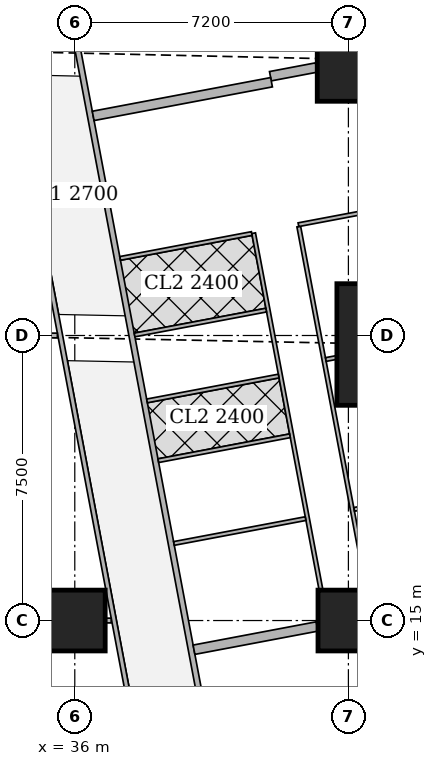
"""IFC4 building model, lengths in metres.
Left out: names, types, materials, properties, quantities, classifications, styles, units other than length and angle.
Written with IfcOpenShell. Run it as: python <this file> out.ifc"""

import sys

from ifc_helpers import new_model, si_unit, direction, frame, frame_2d, origin, origin_2d, place, context, subcontext, project, spatial, rectangle, extrude, element, fill, save


model = new_model("IFC4")
c1 = context("Model", 3, precision=1e-05, world=origin(), true_north=direction((0.0, 1.0)))
c2 = subcontext(c1, "Body", "Model", "MODEL_VIEW")
j1 = project(units=[si_unit("LENGTHUNIT", "METRE"), si_unit("PLANEANGLEUNIT", "RADIAN")], contexts=[c1])
p1 = place(None, origin())
s1 = spatial("IfcSite", under=j1, at=p1, CompositionType="ELEMENT")
p2 = place(p1, origin())
s2 = spatial("IfcBuilding", under=s1, at=p2, CompositionType="ELEMENT")
p3 = place(p2, frame((0.0, 0.0, 89.15)))
s3 = spatial("IfcBuildingStorey", under=s2, at=p3, CompositionType="ELEMENT", Elevation=89.15)
for number, where, z_axis, x_axis in (
    (1, (36.0, 15.0, 0.0), (0.0, 0.0, 1.0), (1.0, 0.0, 0.0)),
    (2, (43.2, 15.0, 0.0), (0.0, 0.0, 1.0), (1.0, 0.0, 0.0)),
):
    element("IfcColumn", number, at=place(p3, frame(where, z_axis=z_axis, x_axis=x_axis)), inside=s3, PredefinedType="COLUMN", context=c2, shape_type="SweptSolid", body=[
        extrude(rectangle(XDim=1.6, YDim=1.6, at=origin_2d()), origin(), (0.0, 0.0, 1.0), 3.75),
    ])
p4 = place(p3, frame((44.697, 22.263, 0.0), z_axis=(0.0, 0.0, 1.0), x_axis=(1.0, 0.0, 0.0)))
e3 = element("IfcColumn", 3, at=p4, inside=s3, PredefinedType="COLUMN", context=c2, shape_type="SweptSolid", body=[
    extrude(rectangle(XDim=3.6, YDim=3.2, at=origin_2d()), origin(), (0.0, 0.0, 1.0), 3.75),
])
p5 = place(p3, frame((43.48, 29.763, 0.0), z_axis=(0.0, 0.0, 1.0), x_axis=(1.0, 0.0, 0.0)))
e4 = element("IfcColumn", 4, at=p5, inside=s3, PredefinedType="COLUMN", context=c2, shape_type="SweptSolid", body=[
    extrude(rectangle(XDim=2.2, YDim=2.2, at=origin_2d()), origin(), (0.0, 0.0, 1.0), 3.75),
])
p6 = place(p3, frame((50.653, 2.703, 0.0), z_axis=(0.0, 0.0, 1.0), x_axis=(-0.185612026696, 0.982623109613, 0.0)))
e5 = element("IfcWall", 5, at=p6, inside=s3, PredefinedType="SOLIDWALL", context=c2, shape_type="SweptSolid", body=[
    extrude(rectangle(XDim=41.393, YDim=0.2, at=frame_2d((20.697, 0.0))), origin(), (0.0, 0.0, 1.0), 3.5),
])
p7 = place(p6, frame((1.633, 0.0, 0.9)))
e6 = element("IfcOpeningElement", 6, at=p7, cuts=e5, PredefinedType="OPENING", context=c2, shape_type="SweptSolid", body=[
    extrude(rectangle(XDim=1.8, YDim=1.5, at=frame_2d((0.9, 0.75))), frame((0.0, 0.11, 0.0), z_axis=(0.0, -1.0, 0.0), x_axis=(1.0, 0.0, 0.0)), (0.0, 0.0, 1.0), 0.22),
])
p8 = place(p6, frame((6.032, 0.0, 0.9)))
e7 = element("IfcOpeningElement", 7, at=p8, cuts=e5, PredefinedType="OPENING", context=c2, shape_type="SweptSolid", body=[
    extrude(rectangle(XDim=1.8, YDim=1.5, at=frame_2d((0.9, 0.75))), frame((0.0, 0.11, 0.0), z_axis=(0.0, -1.0, 0.0), x_axis=(1.0, 0.0, 0.0)), (0.0, 0.0, 1.0), 0.22),
])
p9 = place(p6, frame((9.848, 0.0, 0.9)))
e8 = element("IfcOpeningElement", 8, at=p9, cuts=e5, PredefinedType="OPENING", context=c2, shape_type="SweptSolid", body=[
    extrude(rectangle(XDim=1.8, YDim=1.5, at=frame_2d((0.9, 0.75))), frame((0.0, 0.11, 0.0), z_axis=(0.0, -1.0, 0.0), x_axis=(1.0, 0.0, 0.0)), (0.0, 0.0, 1.0), 0.22),
])
p10 = place(p6, frame((13.664, 0.0, 0.9)))
e9 = element("IfcOpeningElement", 9, at=p10, cuts=e5, PredefinedType="OPENING", context=c2, shape_type="SweptSolid", body=[
    extrude(rectangle(XDim=1.8, YDim=1.5, at=frame_2d((0.9, 0.75))), frame((0.0, 0.11, 0.0), z_axis=(0.0, -1.0, 0.0), x_axis=(1.0, 0.0, 0.0)), (0.0, 0.0, 1.0), 0.22),
])
p11 = place(p6, frame((17.481, 0.0, 0.9)))
e10 = element("IfcOpeningElement", 10, at=p11, cuts=e5, PredefinedType="OPENING", context=c2, shape_type="SweptSolid", body=[
    extrude(rectangle(XDim=1.8, YDim=1.5, at=frame_2d((0.9, 0.75))), frame((0.0, 0.11, 0.0), z_axis=(0.0, -1.0, 0.0), x_axis=(1.0, 0.0, 0.0)), (0.0, 0.0, 1.0), 0.22),
])
p12 = place(p6, frame((21.297, 0.0, 0.9)))
e11 = element("IfcOpeningElement", 11, at=p12, cuts=e5, PredefinedType="OPENING", context=c2, shape_type="SweptSolid", body=[
    extrude(rectangle(XDim=1.8, YDim=1.5, at=frame_2d((0.9, 0.75))), frame((0.0, 0.11, 0.0), z_axis=(0.0, -1.0, 0.0), x_axis=(1.0, 0.0, 0.0)), (0.0, 0.0, 1.0), 0.22),
])
p13 = place(p6, frame((25.113, 0.0, 0.9)))
e12 = element("IfcOpeningElement", 12, at=p13, cuts=e5, PredefinedType="OPENING", context=c2, shape_type="SweptSolid", body=[
    extrude(rectangle(XDim=1.8, YDim=1.5, at=frame_2d((0.9, 0.75))), frame((0.0, 0.11, 0.0), z_axis=(0.0, -1.0, 0.0), x_axis=(1.0, 0.0, 0.0)), (0.0, 0.0, 1.0), 0.22),
])
p14 = place(p6, frame((28.93, 0.0, 0.9)))
e13 = element("IfcOpeningElement", 13, at=p14, cuts=e5, PredefinedType="OPENING", context=c2, shape_type="SweptSolid", body=[
    extrude(rectangle(XDim=1.8, YDim=1.5, at=frame_2d((0.9, 0.75))), frame((0.0, 0.11, 0.0), z_axis=(0.0, -1.0, 0.0), x_axis=(1.0, 0.0, 0.0)), (0.0, 0.0, 1.0), 0.22),
])
p15 = place(p6, frame((32.746, 0.0, 0.9)))
e14 = element("IfcOpeningElement", 14, at=p15, cuts=e5, PredefinedType="OPENING", context=c2, shape_type="SweptSolid", body=[
    extrude(rectangle(XDim=1.8, YDim=1.5, at=frame_2d((0.9, 0.75))), frame((0.0, 0.11, 0.0), z_axis=(0.0, -1.0, 0.0), x_axis=(1.0, 0.0, 0.0)), (0.0, 0.0, 1.0), 0.22),
])
p16 = place(p6, frame((36.481, 0.0, 0.9)))
e15 = element("IfcOpeningElement", 15, at=p16, cuts=e5, PredefinedType="OPENING", context=c2, shape_type="SweptSolid", body=[
    extrude(rectangle(XDim=1.8, YDim=1.5, at=frame_2d((0.9, 0.75))), frame((0.0, 0.11, 0.0), z_axis=(0.0, -1.0, 0.0), x_axis=(1.0, 0.0, 0.0)), (0.0, 0.0, 1.0), 0.22),
])
p17 = place(p3, frame((33.127, 45.65, 0.0), z_axis=(0.0, 0.0, 1.0), x_axis=(0.185598547723, -0.98262565562, 0.0)))
e16 = element("IfcWall", 16, at=p17, inside=s3, PredefinedType="SOLIDWALL", context=c2, shape_type="SweptSolid", body=[
    extrude(rectangle(XDim=47.118, YDim=0.15, at=frame_2d((23.559, 0.0))), origin(), (0.0, 0.0, 1.0), 2.2),
])
p18 = place(p17, frame((15.285, 0.0, 0.0)))
e17 = element("IfcOpeningElement", 17, at=p18, cuts=e16, PredefinedType="OPENING", context=c2, shape_type="SweptSolid", body=[
    extrude(rectangle(XDim=1.0, YDim=2.1, at=frame_2d((0.5, 1.05))), frame((0.0, 0.085, 0.0), z_axis=(0.0, -1.0, 0.0), x_axis=(1.0, 0.0, 0.0)), (0.0, 0.0, 1.0), 0.17),
])
p19 = place(p17, frame((19.102, 0.0, 0.0)))
e18 = element("IfcOpeningElement", 18, at=p19, cuts=e16, PredefinedType="OPENING", context=c2, shape_type="SweptSolid", body=[
    extrude(rectangle(XDim=1.0, YDim=2.1, at=frame_2d((0.5, 1.05))), frame((0.0, 0.085, 0.0), z_axis=(0.0, -1.0, 0.0), x_axis=(1.0, 0.0, 0.0)), (0.0, 0.0, 1.0), 0.17),
])
p20 = place(p17, frame((33.88, 0.0, 0.0)))
e19 = element("IfcOpeningElement", 19, at=p20, cuts=e16, PredefinedType="OPENING", context=c2, shape_type="SweptSolid", body=[
    extrude(rectangle(XDim=1.0, YDim=2.1, at=frame_2d((0.5, 1.05))), frame((0.0, 0.085, 0.0), z_axis=(0.0, -1.0, 0.0), x_axis=(1.0, 0.0, 0.0)), (0.0, 0.0, 1.0), 0.17),
])
p21 = place(p3, frame((41.894, 25.366, 0.0), z_axis=(0.0, 0.0, 1.0), x_axis=(0.185599502781, -0.982625475228, 0.0)))
e20 = element("IfcWall", 20, at=p21, inside=s3, PredefinedType="PARTITIONING", context=c2, shape_type="SweptSolid", body=[
    extrude(rectangle(XDim=9.725, YDim=0.1, at=frame_2d((4.862, 0.0))), origin(), (0.0, 0.0, 1.0), 2.5),
])
p22 = place(p21, frame((0.151, 0.0, 0.0)))
e21 = element("IfcOpeningElement", 21, at=p22, cuts=e20, PredefinedType="OPENING", context=c2, shape_type="SweptSolid", body=[
    extrude(rectangle(XDim=0.9, YDim=2.1, at=frame_2d((0.45, 1.05))), frame((0.0, 0.06, 0.0), z_axis=(0.0, -1.0, 0.0), x_axis=(1.0, 0.0, 0.0)), (0.0, 0.0, 1.0), 0.12),
])
p23 = place(p21, frame((5.05, 0.0, 0.0)))
e22 = element("IfcOpeningElement", 22, at=p23, cuts=e20, PredefinedType="OPENING", context=c2, shape_type="SweptSolid", body=[
    extrude(rectangle(XDim=0.9, YDim=2.1, at=frame_2d((0.45, 1.05))), frame((0.0, 0.06, 0.0), z_axis=(0.0, -1.0, 0.0), x_axis=(1.0, 0.0, 0.0)), (0.0, 0.0, 1.0), 0.12),
])
p24 = place(p21, frame((7.783, 0.0, 0.0)))
e23 = element("IfcOpeningElement", 23, at=p24, cuts=e20, PredefinedType="OPENING", context=c2, shape_type="SweptSolid", body=[
    extrude(rectangle(XDim=0.9, YDim=2.1, at=frame_2d((0.45, 1.05))), frame((0.0, 0.06, 0.0), z_axis=(0.0, -1.0, 0.0), x_axis=(1.0, 0.0, 0.0)), (0.0, 0.0, 1.0), 0.12),
])
p25 = place(p3, frame((40.706, 25.192, 0.0), z_axis=(0.0, 0.0, 1.0), x_axis=(0.185591412258, -0.982627003342, 0.0)))
e24 = element("IfcWall", 24, at=p25, inside=s3, PredefinedType="PARTITIONING", context=c2, shape_type="SweptSolid", body=[
    extrude(rectangle(XDim=9.548, YDim=0.1, at=frame_2d((4.774, 0.0))), origin(), (0.0, 0.0, 1.0), 2.5),
])
p26 = place(p25, frame((0.575, 0.0, 0.0)))
e25 = element("IfcOpeningElement", 25, at=p26, cuts=e24, PredefinedType="OPENING", context=c2, shape_type="SweptSolid", body=[
    extrude(rectangle(XDim=0.9, YDim=2.1, at=frame_2d((0.45, 1.05))), frame((0.0, 0.06, 0.0), z_axis=(0.0, -1.0, 0.0), x_axis=(1.0, 0.0, 0.0)), (0.0, 0.0, 1.0), 0.12),
])
p27 = place(p25, frame((4.166, 0.0, 0.0)))
e26 = element("IfcOpeningElement", 26, at=p27, cuts=e24, PredefinedType="OPENING", context=c2, shape_type="SweptSolid", body=[
    extrude(rectangle(XDim=0.9, YDim=2.1, at=frame_2d((0.45, 1.05))), frame((0.0, 0.06, 0.0), z_axis=(0.0, -1.0, 0.0), x_axis=(1.0, 0.0, 0.0)), (0.0, 0.0, 1.0), 0.12),
])
p28 = place(p25, frame((2.483, 0.0, 0.0)))
e27 = element("IfcOpeningElement", 27, at=p28, cuts=e24, PredefinedType="OPENING", context=c2, shape_type="SweptSolid", body=[
    extrude(rectangle(XDim=0.9, YDim=2.1, at=frame_2d((0.45, 1.05))), frame((0.0, 0.06, 0.0), z_axis=(0.0, -1.0, 0.0), x_axis=(1.0, 0.0, 0.0)), (0.0, 0.0, 1.0), 0.12),
])
p29 = place(p25, frame((6.074, 0.0, 0.0)))
e28 = element("IfcOpeningElement", 28, at=p29, cuts=e24, PredefinedType="OPENING", context=c2, shape_type="SweptSolid", body=[
    extrude(rectangle(XDim=0.9, YDim=2.1, at=frame_2d((0.45, 1.05))), frame((0.0, 0.06, 0.0), z_axis=(0.0, -1.0, 0.0), x_axis=(1.0, 0.0, 0.0)), (0.0, 0.0, 1.0), 0.12),
])
p30 = place(p3, frame((46.11, 26.213, 0.0), z_axis=(0.0, 0.0, 1.0), x_axis=(-0.982633535512, -0.185556823879, 0.0)))
e29 = element("IfcWall", 29, at=p30, inside=s3, PredefinedType="PARTITIONING", context=c2, shape_type="SweptSolid", body=[
    extrude(rectangle(XDim=4.3, YDim=0.1, at=frame_2d((2.15, 0.0))), origin(), (0.0, 0.0, 1.0), 2.2),
])
p31 = place(p3, frame((42.887, 21.921, 0.0), z_axis=(0.0, 0.0, 1.0), x_axis=(-0.982688058078, -0.185267861514, 0.0)))
e30 = element("IfcWall", 30, at=p31, inside=s3, PredefinedType="PARTITIONING", context=c2, shape_type="SweptSolid", body=[
    extrude(rectangle(XDim=0.286, YDim=0.1, at=frame_2d((0.143, 0.0))), origin(), (0.0, 0.0, 1.0), 2.5),
])
p32 = place(p3, frame((47.527, 18.712, 0.0), z_axis=(0.0, 0.0, 1.0), x_axis=(-0.982665405803, -0.185387972203, 0.0)))
e31 = element("IfcWall", 31, at=p32, inside=s3, PredefinedType="PARTITIONING", context=c2, shape_type="SweptSolid", body=[
    extrude(rectangle(XDim=4.25, YDim=0.1, at=frame_2d((2.125, 0.0))), origin(), (0.0, 0.0, 1.0), 2.2),
])
p33 = place(p3, frame((40.657, 25.183, 0.0), z_axis=(0.0, 0.0, 1.0), x_axis=(-0.982585626838, -0.185810349366, 0.0)))
e32 = element("IfcWall", 32, at=p33, inside=s3, PredefinedType="PARTITIONING", context=c2, shape_type="SweptSolid", body=[
    extrude(rectangle(XDim=3.525, YDim=0.1, at=frame_2d((1.763, 0.0))), origin(), (0.0, 0.0, 1.0), 3.5),
])
p34 = place(p3, frame((41.365, 21.433, 0.0), z_axis=(0.0, 0.0, 1.0), x_axis=(-0.982638553676, -0.185530247748, 0.0)))
e33 = element("IfcWall", 33, at=p34, inside=s3, PredefinedType="PARTITIONING", context=c2, shape_type="SweptSolid", body=[
    extrude(rectangle(XDim=3.525, YDim=0.1, at=frame_2d((1.763, 0.0))), origin(), (0.0, 0.0, 1.0), 3.5),
])
p35 = place(p3, frame((42.073, 17.682, 0.0), z_axis=(0.0, 0.0, 1.0), x_axis=(-0.98265117712, -0.185463376723, 0.0)))
e34 = element("IfcWall", 34, at=p35, inside=s3, PredefinedType="PARTITIONING", context=c2, shape_type="SweptSolid", body=[
    extrude(rectangle(XDim=3.525, YDim=0.1, at=frame_2d((1.763, 0.0))), origin(), (0.0, 0.0, 1.0), 3.5),
])
p36 = place(p35, frame((1.325, 0.0, 0.0)))
e35 = element("IfcOpeningElement", 35, at=p36, cuts=e34, PredefinedType="OPENING", context=c2, shape_type="SweptSolid", body=[
    extrude(rectangle(XDim=0.9, YDim=2.1, at=frame_2d((0.45, 1.05))), frame((0.0, 0.06, 0.0), z_axis=(0.0, -1.0, 0.0), x_axis=(1.0, 0.0, 0.0)), (0.0, 0.0, 1.0), 0.12),
])
p37 = place(p3, frame((41.037, 23.168, 0.0), z_axis=(0.0, 0.0, 1.0), x_axis=(-0.982638553676, -0.185530247748, 0.0)))
e36 = element("IfcWall", 36, at=p37, inside=s3, PredefinedType="PARTITIONING", context=c2, shape_type="SweptSolid", body=[
    extrude(rectangle(XDim=3.525, YDim=0.1, at=frame_2d((1.763, 0.0))), origin(), (0.0, 0.0, 1.0), 2.5),
])
p38 = place(p3, frame((41.662, 19.861, 0.0), z_axis=(0.0, 0.0, 1.0), x_axis=(-0.982588017646, -0.185797706064, 0.0)))
e37 = element("IfcWall", 37, at=p38, inside=s3, PredefinedType="PARTITIONING", context=c2, shape_type="SweptSolid", body=[
    extrude(rectangle(XDim=3.525, YDim=0.1, at=frame_2d((1.763, 0.0))), origin(), (0.0, 0.0, 1.0), 3.5),
])
p39 = place(p3, frame((42.356, 29.551, 0.0), z_axis=(0.0, 0.0, 1.0), x_axis=(-0.982529084329, -0.186109103615, 0.0)))
e38 = element("IfcWall", 38, at=p39, inside=s3, PredefinedType="SOLIDWALL", context=c2, shape_type="SweptSolid", body=[
    extrude(rectangle(XDim=1.23, YDim=0.25, at=frame_2d((0.615, 0.0))), origin(), (0.0, 0.0, 1.0), 2.5),
])
p40 = place(p3, frame((41.177, 29.164, 0.0), z_axis=(0.0, 0.0, 1.0), x_axis=(-0.982642846239, -0.185507511263, 0.0)))
e39 = element("IfcWall", 39, at=p40, inside=s3, PredefinedType="SOLIDWALL", context=c2, shape_type="SweptSolid", body=[
    extrude(rectangle(XDim=4.776, YDim=0.25, at=frame_2d((2.388, 0.0))), origin(), (0.0, 0.0, 1.0), 2.5),
])
p41 = place(p3, frame((42.376, 14.844, 0.0), z_axis=(0.0, 0.0, 1.0), x_axis=(-0.982610440948, -0.18567908159, 0.0)))
e40 = element("IfcWall", 40, at=p41, inside=s3, PredefinedType="SOLIDWALL", context=c2, shape_type="SweptSolid", body=[
    extrude(rectangle(XDim=3.296, YDim=0.25, at=frame_2d((1.648, 0.0))), origin(), (0.0, 0.0, 1.0), 3.5),
])
p42 = place(p3, frame((37.9, 10.413, 0.0), z_axis=(0.0, 0.0, 1.0), x_axis=(-0.185589740669, 0.982627319058, 0.0)))
e41 = element("IfcWall", 41, at=p42, inside=s3, PredefinedType="PARTITIONING", context=c2, shape_type="SweptSolid", body=[
    extrude(rectangle(XDim=24.602, YDim=0.125, at=frame_2d((12.301, 0.0))), origin(), (0.0, 0.0, 1.0), 2.5),
])
p43 = place(p42, frame((0.708, 0.0, 0.0)))
e42 = element("IfcOpeningElement", 42, at=p43, cuts=e41, PredefinedType="OPENING", context=c2, shape_type="SweptSolid", body=[
    extrude(rectangle(XDim=1.0, YDim=2.1, at=frame_2d((0.5, 1.05))), frame((0.0, 0.073, 0.0), z_axis=(0.0, -1.0, 0.0), x_axis=(1.0, 0.0, 0.0)), (0.0, 0.0, 1.0), 0.145),
])
p44 = place(p42, frame((5.75, 0.0, 0.0)))
e43 = element("IfcOpeningElement", 43, at=p44, cuts=e41, PredefinedType="OPENING", context=c2, shape_type="SweptSolid", body=[
    extrude(rectangle(XDim=1.0, YDim=2.1, at=frame_2d((0.5, 1.05))), frame((0.0, 0.073, 0.0), z_axis=(0.0, -1.0, 0.0), x_axis=(1.0, 0.0, 0.0)), (0.0, 0.0, 1.0), 0.145),
])
p45 = place(p42, frame((13.124, 0.0, 0.0)))
e44 = element("IfcOpeningElement", 44, at=p45, cuts=e41, PredefinedType="OPENING", context=c2, shape_type="SweptSolid", body=[
    extrude(rectangle(XDim=1.0, YDim=2.1, at=frame_2d((0.5, 1.05))), frame((0.0, 0.073, 0.0), z_axis=(0.0, -1.0, 0.0), x_axis=(1.0, 0.0, 0.0)), (0.0, 0.0, 1.0), 0.145),
])
p46 = place(p42, frame((16.94, 0.0, 0.0)))
e45 = element("IfcOpeningElement", 45, at=p46, cuts=e41, PredefinedType="OPENING", context=c2, shape_type="SweptSolid", body=[
    extrude(rectangle(XDim=1.0, YDim=2.1, at=frame_2d((0.5, 1.05))), frame((0.0, 0.073, 0.0), z_axis=(0.0, -1.0, 0.0), x_axis=(1.0, 0.0, 0.0)), (0.0, 0.0, 1.0), 0.145),
])
p47 = place(p42, frame((21.0, 0.0, 0.0)))
e46 = element("IfcOpeningElement", 46, at=p47, cuts=e41, PredefinedType="OPENING", context=c2, shape_type="SweptSolid", body=[
    extrude(rectangle(XDim=1.0, YDim=2.1, at=frame_2d((0.5, 1.05))), frame((0.0, 0.073, 0.0), z_axis=(0.0, -1.0, 0.0), x_axis=(1.0, 0.0, 0.0)), (0.0, 0.0, 1.0), 0.145),
])
p48 = place(p3, frame((36.801, 15.0, 0.0), z_axis=(0.0, 0.0, 1.0), x_axis=(1.0, 0.0, 0.0)))
e47 = element("IfcWall", 47, at=p48, inside=s3, PredefinedType="PARTITIONING", context=c2, shape_type="SweptSolid", body=[
    extrude(rectangle(XDim=0.157, YDim=0.125, at=frame_2d((0.079, 0.0))), origin(), (0.0, 0.0, 1.0), 3.5),
])
p49 = place(p3, frame((33.801, 22.5, 0.0), z_axis=(0.0, 0.0, 1.0), x_axis=(1.0, 0.0, 0.0)))
e48 = element("IfcWall", 48, at=p49, inside=s3, PredefinedType="PARTITIONING", context=c2, shape_type="SweptSolid", body=[
    extrude(rectangle(XDim=1.741, YDim=0.125, at=frame_2d((0.871, 0.0))), origin(), (0.0, 0.0, 1.0), 2.5),
])
p50 = place(p18, origin())
e49 = element("IfcDoor", 49, at=p50, inside=s3, OperationType="SINGLE_SWING_LEFT", PredefinedType="DOOR", context=c2, shape_type="SweptSolid", body=[
    extrude(rectangle(XDim=1.0, YDim=2.1, at=frame_2d((0.5, 1.05))), frame((0.0, 0.025, 0.0), z_axis=(0.0, -1.0, 0.0), x_axis=(1.0, 0.0, 0.0)), (0.0, 0.0, 1.0), 0.05),
])
fill(e17, e49)
p51 = place(p22, origin())
e50 = element("IfcDoor", 50, at=p51, inside=s3, OperationType="SINGLE_SWING_LEFT", PredefinedType="DOOR", context=c2, shape_type="SweptSolid", body=[
    extrude(rectangle(XDim=0.9, YDim=2.1, at=frame_2d((0.45, 1.05))), frame((0.0, 0.025, 0.0), z_axis=(0.0, -1.0, 0.0), x_axis=(1.0, 0.0, 0.0)), (0.0, 0.0, 1.0), 0.05),
])
fill(e21, e50)
p52 = place(p23, origin())
e51 = element("IfcDoor", 51, at=p52, inside=s3, OperationType="SINGLE_SWING_LEFT", PredefinedType="DOOR", context=c2, shape_type="SweptSolid", body=[
    extrude(rectangle(XDim=0.9, YDim=2.1, at=frame_2d((0.45, 1.05))), frame((0.0, 0.025, 0.0), z_axis=(0.0, -1.0, 0.0), x_axis=(1.0, 0.0, 0.0)), (0.0, 0.0, 1.0), 0.05),
])
fill(e22, e51)
p53 = place(p24, origin())
e52 = element("IfcDoor", 52, at=p53, inside=s3, OperationType="SINGLE_SWING_LEFT", PredefinedType="DOOR", context=c2, shape_type="SweptSolid", body=[
    extrude(rectangle(XDim=0.9, YDim=2.1, at=frame_2d((0.45, 1.05))), frame((0.0, 0.025, 0.0), z_axis=(0.0, -1.0, 0.0), x_axis=(1.0, 0.0, 0.0)), (0.0, 0.0, 1.0), 0.05),
])
fill(e23, e52)
p54 = place(p26, origin())
e53 = element("IfcDoor", 53, at=p54, inside=s3, OperationType="SINGLE_SWING_RIGHT", PredefinedType="DOOR", context=c2, shape_type="SweptSolid", body=[
    extrude(rectangle(XDim=0.9, YDim=2.1, at=frame_2d((0.45, 1.05))), frame((0.0, 0.025, 0.0), z_axis=(0.0, -1.0, 0.0), x_axis=(1.0, 0.0, 0.0)), (0.0, 0.0, 1.0), 0.05),
])
fill(e25, e53)
p55 = place(p27, origin())
e54 = element("IfcDoor", 54, at=p55, inside=s3, OperationType="SINGLE_SWING_RIGHT", PredefinedType="DOOR", context=c2, shape_type="SweptSolid", body=[
    extrude(rectangle(XDim=0.9, YDim=2.1, at=frame_2d((0.45, 1.05))), frame((0.0, 0.025, 0.0), z_axis=(0.0, -1.0, 0.0), x_axis=(1.0, 0.0, 0.0)), (0.0, 0.0, 1.0), 0.05),
])
fill(e26, e54)
p56 = place(p28, origin())
e55 = element("IfcDoor", 55, at=p56, inside=s3, OperationType="SINGLE_SWING_RIGHT", PredefinedType="DOOR", context=c2, shape_type="SweptSolid", body=[
    extrude(rectangle(XDim=0.9, YDim=2.1, at=frame_2d((0.45, 1.05))), frame((0.0, 0.025, 0.0), z_axis=(0.0, -1.0, 0.0), x_axis=(1.0, 0.0, 0.0)), (0.0, 0.0, 1.0), 0.05),
])
fill(e27, e55)
p57 = place(p29, origin())
e56 = element("IfcDoor", 56, at=p57, inside=s3, OperationType="SINGLE_SWING_LEFT", PredefinedType="DOOR", context=c2, shape_type="SweptSolid", body=[
    extrude(rectangle(XDim=0.9, YDim=2.1, at=frame_2d((0.45, 1.05))), frame((0.0, 0.025, 0.0), z_axis=(0.0, -1.0, 0.0), x_axis=(1.0, 0.0, 0.0)), (0.0, 0.0, 1.0), 0.05),
])
fill(e28, e56)
p58 = place(p19, origin())
e57 = element("IfcDoor", 57, at=p58, inside=s3, OperationType="SINGLE_SWING_LEFT", PredefinedType="DOOR", context=c2, shape_type="SweptSolid", body=[
    extrude(rectangle(XDim=1.0, YDim=2.1, at=frame_2d((0.5, 1.05))), frame((0.0, 0.025, 0.0), z_axis=(0.0, -1.0, 0.0), x_axis=(1.0, 0.0, 0.0)), (0.0, 0.0, 1.0), 0.05),
])
fill(e18, e57)
p59 = place(p36, origin())
e58 = element("IfcDoor", 58, at=p59, inside=s3, OperationType="SINGLE_SWING_RIGHT", PredefinedType="DOOR", context=c2, shape_type="SweptSolid", body=[
    extrude(rectangle(XDim=0.9, YDim=2.1, at=frame_2d((0.45, 1.05))), frame((0.0, 0.025, 0.0), z_axis=(0.0, -1.0, 0.0), x_axis=(1.0, 0.0, 0.0)), (0.0, 0.0, 1.0), 0.05),
])
fill(e35, e58)
p60 = place(p44, origin())
e59 = element("IfcDoor", 59, at=p60, inside=s3, OperationType="SINGLE_SWING_LEFT", PredefinedType="DOOR", context=c2, shape_type="SweptSolid", body=[
    extrude(rectangle(XDim=1.0, YDim=2.1, at=frame_2d((0.5, 1.05))), frame((0.0, 0.025, 0.0), z_axis=(0.0, -1.0, 0.0), x_axis=(1.0, 0.0, 0.0)), (0.0, 0.0, 1.0), 0.05),
])
fill(e43, e59)
p61 = place(p45, origin())
e60 = element("IfcDoor", 60, at=p61, inside=s3, OperationType="SINGLE_SWING_LEFT", PredefinedType="DOOR", context=c2, shape_type="SweptSolid", body=[
    extrude(rectangle(XDim=1.0, YDim=2.1, at=frame_2d((0.5, 1.05))), frame((0.0, 0.025, 0.0), z_axis=(0.0, -1.0, 0.0), x_axis=(1.0, 0.0, 0.0)), (0.0, 0.0, 1.0), 0.05),
])
fill(e44, e60)
save(model, sys.argv[1])
